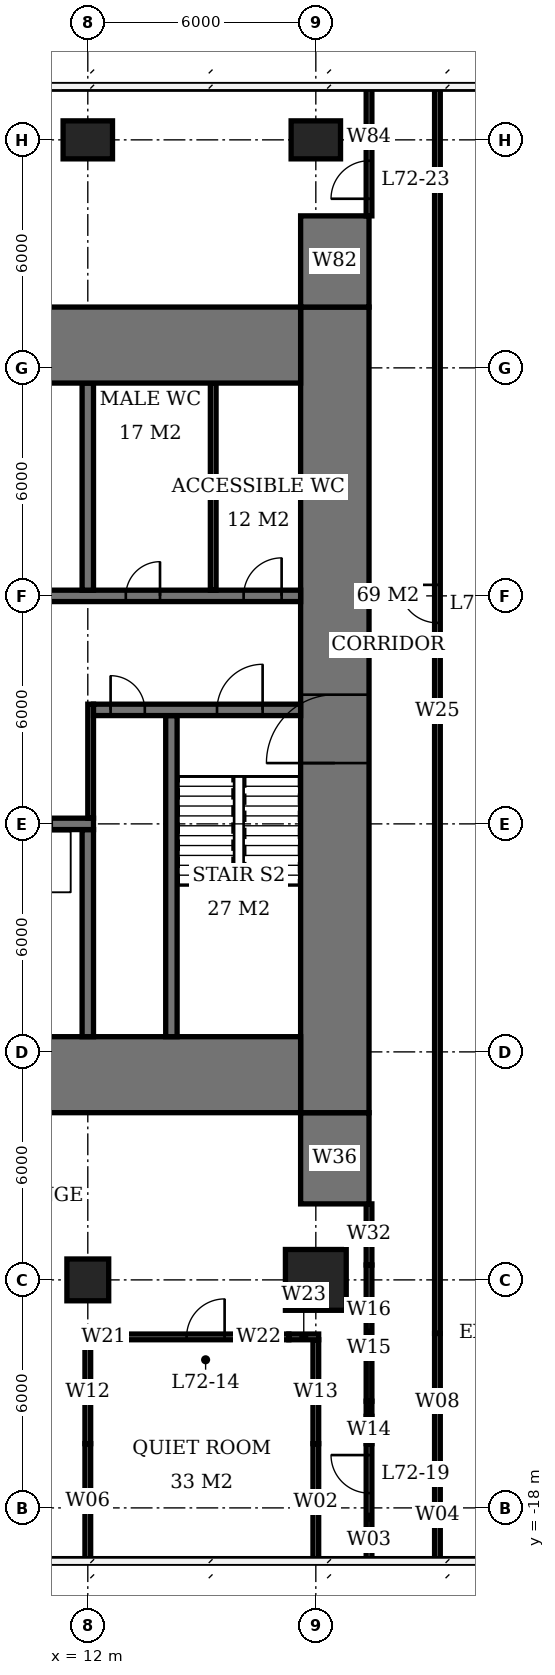
"""IFC4 building model, lengths in metres.
Left out: names, types, materials, properties, quantities, classifications, styles, units other than length and angle.
Written with IfcOpenShell. Run it as: python <this file> out.ifc"""

import sys

from ifc_helpers import new_model, si_unit, direction, frame, frame_2d, origin, origin_2d, place, context, subcontext, project, spatial, rectangle, extrude, element, fill, save


model = new_model("IFC4")
c1 = context("Model", 3, precision=1e-05, world=origin(), true_north=direction((0.0, 1.0)))
c2 = subcontext(c1, "Body", "Model", "MODEL_VIEW")
j1 = project(units=[si_unit("LENGTHUNIT", "METRE"), si_unit("PLANEANGLEUNIT", "RADIAN")], contexts=[c1])
p1 = place(None, origin())
s1 = spatial("IfcSite", under=j1, at=p1, CompositionType="ELEMENT")
p2 = place(p1, origin())
s2 = spatial("IfcBuilding", under=s1, at=p2, CompositionType="ELEMENT")
p3 = place(p2, frame((0.0, 0.0, 291.8)))
s3 = spatial("IfcBuildingStorey", under=s2, at=p3, CompositionType="ELEMENT", Elevation=291.8)
p4 = place(p3, frame((12.0, -12.0, 0.0), z_axis=(0.0, 0.0, 1.0), x_axis=(1.0, 0.0, 0.0)))
e1 = element("IfcColumn", 1, at=p4, inside=s3, PredefinedType="COLUMN", context=c2, shape_type="SweptSolid", body=[
    extrude(rectangle(XDim=1.1, YDim=1.1, at=origin_2d()), origin(), (0.0, 0.0, 1.0), 3.9),
])
p5 = place(p3, frame((12.0, 18.0, 0.0), z_axis=(0.0, 0.0, 1.0), x_axis=(1.0, 0.0, 0.0)))
e2 = element("IfcColumn", 2, at=p5, inside=s3, PredefinedType="COLUMN", context=c2, shape_type="SweptSolid", body=[
    extrude(rectangle(XDim=1.3, YDim=1.0, at=origin_2d()), origin(), (0.0, 0.0, 1.0), 3.9),
])
p6 = place(p3, frame((18.0, -12.0, 0.0), z_axis=(0.0, 0.0, 1.0), x_axis=(1.0, 0.0, 0.0)))
e3 = element("IfcColumn", 3, at=p6, inside=s3, PredefinedType="COLUMN", context=c2, shape_type="SweptSolid", body=[
    extrude(rectangle(XDim=1.6, YDim=1.6, at=origin_2d()), origin(), (0.0, 0.0, 1.0), 3.9),
])
p7 = place(p3, frame((18.0, 18.0, 0.0), z_axis=(0.0, 0.0, 1.0), x_axis=(1.0, 0.0, 0.0)))
e4 = element("IfcColumn", 4, at=p7, inside=s3, PredefinedType="COLUMN", context=c2, shape_type="SweptSolid", body=[
    extrude(rectangle(XDim=1.3, YDim=1.0, at=origin_2d()), origin(), (0.0, 0.0, 1.0), 3.9),
])
for number, where, z_axis, x_axis in (
    (5, (-5.6, -6.6, 0.0), (0.0, 0.0, 1.0), (1.0, 0.0, 0.0)),
    (6, (-5.6, 12.6, 0.0), (0.0, 0.0, 1.0), (1.0, 0.0, 0.0)),
):
    element("IfcWall", number, at=place(p3, frame(where, z_axis=z_axis, x_axis=x_axis)), inside=s3, PredefinedType="SHEAR", context=c2, shape_type="SweptSolid", body=[
        extrude(rectangle(XDim=23.2, YDim=2.0, at=frame_2d((11.6, 0.0))), origin(), (0.0, 0.0, 1.0), 3.9),
    ])
p8 = place(p3, frame((18.5, -7.6, 0.0), z_axis=(0.0, 0.0, 1.0), x_axis=(0.0, 1.0, 0.0)))
e7 = element("IfcWall", 7, at=p8, inside=s3, PredefinedType="SHEAR", context=c2, shape_type="SweptSolid", body=[
    extrude(rectangle(XDim=21.2, YDim=1.8, at=frame_2d((10.6, 0.0))), origin(), (0.0, 0.0, 1.0), 3.9),
])
p9 = place(p8, frame((9.2, 0.0, 0.0)))
e8 = element("IfcOpeningElement", 8, at=p9, cuts=e7, PredefinedType="OPENING", context=c2, shape_type="SweptSolid", body=[
    extrude(rectangle(XDim=1.8, YDim=2.4, at=frame_2d((0.9, 1.2))), frame((0.0, 0.91, 0.0), z_axis=(0.0, -1.0, 0.0), x_axis=(1.0, 0.0, 0.0)), (0.0, 0.0, 1.0), 1.82),
])
for number, where, z_axis, x_axis in (
    (9, (18.5, -10.0, 0.0), (0.0, 0.0, 1.0), (0.0, 1.0, 0.0)),
    (10, (18.5, 13.6, 0.0), (0.0, 0.0, 1.0), (0.0, 1.0, 0.0)),
):
    element("IfcWall", number, at=place(p3, frame(where, z_axis=z_axis, x_axis=x_axis)), inside=s3, PredefinedType="SHEAR", context=c2, shape_type="SweptSolid", body=[
        extrude(rectangle(XDim=2.4, YDim=1.8, at=frame_2d((1.2, 0.0))), origin(), (0.0, 0.0, 1.0), 3.9),
    ])
p10 = place(p3, frame((-5.6, 0.0, 0.0), z_axis=(0.0, 0.0, 1.0), x_axis=(1.0, 0.0, 0.0)))
e11 = element("IfcWall", 11, at=p10, inside=s3, PredefinedType="SHEAR", context=c2, shape_type="SweptSolid", body=[
    extrude(rectangle(XDim=17.75, YDim=0.3, at=frame_2d((8.875, 0.0))), origin(), (0.0, 0.0, 1.0), 3.9),
])
p11 = place(p10, frame((0.6, 0.0, 0.0)))
e12 = element("IfcOpeningElement", 12, at=p11, cuts=e11, PredefinedType="OPENING", context=c2, shape_type="SweptSolid", body=[
    extrude(rectangle(XDim=0.9, YDim=2.1, at=frame_2d((0.45, 1.05))), frame((0.0, 0.16, 0.0), z_axis=(0.0, -1.0, 0.0), x_axis=(1.0, 0.0, 0.0)), (0.0, 0.0, 1.0), 0.32),
])
p12 = place(p10, frame((3.7, 0.0, 0.0)))
e13 = element("IfcOpeningElement", 13, at=p12, cuts=e11, PredefinedType="OPENING", context=c2, shape_type="SweptSolid", body=[
    extrude(rectangle(XDim=1.0, YDim=2.1, at=frame_2d((0.5, 1.05))), frame((0.0, 0.16, 0.0), z_axis=(0.0, -1.0, 0.0), x_axis=(1.0, 0.0, 0.0)), (0.0, 0.0, 1.0), 0.32),
])
p13 = place(p10, frame((9.6, 0.0, 0.0)))
e14 = element("IfcOpeningElement", 14, at=p13, cuts=e11, PredefinedType="OPENING", context=c2, shape_type="SweptSolid", body=[
    extrude(rectangle(XDim=1.0, YDim=2.1, at=frame_2d((0.5, 1.05))), frame((0.0, 0.16, 0.0), z_axis=(0.0, -1.0, 0.0), x_axis=(1.0, 0.0, 0.0)), (0.0, 0.0, 1.0), 0.32),
])
p14 = place(p10, frame((12.55, 0.0, 0.0)))
e15 = element("IfcOpeningElement", 15, at=p14, cuts=e11, PredefinedType="OPENING", context=c2, shape_type="SweptSolid", body=[
    extrude(rectangle(XDim=1.1, YDim=2.1, at=frame_2d((0.55, 1.05))), frame((0.0, 0.16, 0.0), z_axis=(0.0, -1.0, 0.0), x_axis=(1.0, 0.0, 0.0)), (0.0, 0.0, 1.0), 0.32),
])
p15 = place(p10, frame((15.55, 0.0, 0.0)))
e16 = element("IfcOpeningElement", 16, at=p15, cuts=e11, PredefinedType="OPENING", context=c2, shape_type="SweptSolid", body=[
    extrude(rectangle(XDim=1.1, YDim=2.1, at=frame_2d((0.55, 1.05))), frame((0.0, 0.16, 0.0), z_axis=(0.0, -1.0, 0.0), x_axis=(1.0, 0.0, 0.0)), (0.0, 0.0, 1.0), 0.32),
])
p16 = place(p3, frame((12.15, 3.0, 0.0), z_axis=(0.0, 0.0, 1.0), x_axis=(1.0, 0.0, 0.0)))
e17 = element("IfcWall", 17, at=p16, inside=s3, PredefinedType="SHEAR", context=c2, shape_type="SweptSolid", body=[
    extrude(rectangle(XDim=5.45, YDim=0.3, at=frame_2d((2.725, 0.0))), origin(), (0.0, 0.0, 1.0), 3.9),
])
p17 = place(p16, frame((3.25, 0.0, 0.0)))
e18 = element("IfcOpeningElement", 18, at=p17, cuts=e17, PredefinedType="OPENING", context=c2, shape_type="SweptSolid", body=[
    extrude(rectangle(XDim=1.2, YDim=2.1, at=frame_2d((0.6, 1.05))), frame((0.0, 0.16, 0.0), z_axis=(0.0, -1.0, 0.0), x_axis=(1.0, 0.0, 0.0)), (0.0, 0.0, 1.0), 0.32),
])
p18 = place(p16, frame((0.45, 0.0, 0.0)))
e19 = element("IfcOpeningElement", 19, at=p18, cuts=e17, PredefinedType="OPENING", context=c2, shape_type="SweptSolid", body=[
    extrude(rectangle(XDim=0.9, YDim=2.1, at=frame_2d((0.45, 1.05))), frame((0.0, 0.16, 0.0), z_axis=(0.0, -1.0, 0.0), x_axis=(1.0, 0.0, 0.0)), (0.0, 0.0, 1.0), 0.32),
])
p19 = place(p3, frame((-0.15, 6.0, 0.0), z_axis=(0.0, 0.0, 1.0), x_axis=(1.0, 0.0, 0.0)))
e20 = element("IfcWall", 20, at=p19, inside=s3, PredefinedType="SHEAR", context=c2, shape_type="SweptSolid", body=[
    extrude(rectangle(XDim=17.75, YDim=0.3, at=frame_2d((8.875, 0.0))), origin(), (0.0, 0.0, 1.0), 3.9),
])
p20 = place(p19, frame((13.15, 0.0, 0.0)))
e21 = element("IfcOpeningElement", 21, at=p20, cuts=e20, PredefinedType="OPENING", context=c2, shape_type="SweptSolid", body=[
    extrude(rectangle(XDim=0.9, YDim=2.1, at=frame_2d((0.45, 1.05))), frame((0.0, 0.16, 0.0), z_axis=(0.0, -1.0, 0.0), x_axis=(1.0, 0.0, 0.0)), (0.0, 0.0, 1.0), 0.32),
])
p21 = place(p19, frame((16.25, 0.0, 0.0)))
e22 = element("IfcOpeningElement", 22, at=p21, cuts=e20, PredefinedType="OPENING", context=c2, shape_type="SweptSolid", body=[
    extrude(rectangle(XDim=1.0, YDim=2.1, at=frame_2d((0.5, 1.05))), frame((0.0, 0.16, 0.0), z_axis=(0.0, -1.0, 0.0), x_axis=(1.0, 0.0, 0.0)), (0.0, 0.0, 1.0), 0.32),
])
p22 = place(p19, frame((1.1, 0.0, 0.0)))
e23 = element("IfcOpeningElement", 23, at=p22, cuts=e20, PredefinedType="OPENING", context=c2, shape_type="SweptSolid", body=[
    extrude(rectangle(XDim=1.1, YDim=2.1, at=frame_2d((0.55, 1.05))), frame((0.0, 0.16, 0.0), z_axis=(0.0, -1.0, 0.0), x_axis=(1.0, 0.0, 0.0)), (0.0, 0.0, 1.0), 0.32),
])
p23 = place(p19, frame((4.1, 0.0, 0.0)))
e24 = element("IfcOpeningElement", 24, at=p23, cuts=e20, PredefinedType="OPENING", context=c2, shape_type="SweptSolid", body=[
    extrude(rectangle(XDim=1.1, YDim=2.1, at=frame_2d((0.55, 1.05))), frame((0.0, 0.16, 0.0), z_axis=(0.0, -1.0, 0.0), x_axis=(1.0, 0.0, 0.0)), (0.0, 0.0, 1.0), 0.32),
])
for number, where, z_axis, x_axis in (
    (25, (12.0, -5.6, 0.0), (0.0, 0.0, 1.0), (0.0, 1.0, 0.0)),
    (26, (12.0, 6.15, 0.0), (0.0, 0.0, 1.0), (0.0, 1.0, 0.0)),
):
    element("IfcWall", number, at=place(p3, frame(where, z_axis=z_axis, x_axis=x_axis)), inside=s3, PredefinedType="SHEAR", context=c2, shape_type="SweptSolid", body=[
        extrude(rectangle(XDim=5.45, YDim=0.3, at=frame_2d((2.725, 0.0))), origin(), (0.0, 0.0, 1.0), 3.9),
    ])
p24 = place(p3, frame((14.2, -5.6, 0.0), z_axis=(0.0, 0.0, 1.0), x_axis=(0.0, 1.0, 0.0)))
e27 = element("IfcWall", 27, at=p24, inside=s3, PredefinedType="SHEAR", context=c2, shape_type="SweptSolid", body=[
    extrude(rectangle(XDim=8.45, YDim=0.3, at=frame_2d((4.225, 0.0))), origin(), (0.0, 0.0, 1.0), 3.9),
])
p25 = place(p3, frame((15.3, 6.15, 0.0), z_axis=(0.0, 0.0, 1.0), x_axis=(0.0, 1.0, 0.0)))
e28 = element("IfcWall", 28, at=p25, inside=s3, PredefinedType="PLUMBINGWALL", context=c2, shape_type="SweptSolid", body=[
    extrude(rectangle(XDim=5.45, YDim=0.15, at=frame_2d((2.725, 0.0))), origin(), (0.0, 0.0, 1.0), 3.65),
])
p26 = place(p3, frame((11.925, -13.5, 0.0), z_axis=(0.0, 0.0, 1.0), x_axis=(1.0, 0.0, 0.0)))
e29 = element("IfcWall", 29, at=p26, inside=s3, PredefinedType="PARTITIONING", context=c2, shape_type="SweptSolid", body=[
    extrude(rectangle(XDim=0.985, YDim=0.15, at=frame_2d((0.492, 0.0))), origin(), (0.0, 0.0, 1.0), 2.65),
])
p27 = place(p3, frame((12.91, -13.5, 0.0), z_axis=(0.0, 0.0, 1.0), x_axis=(1.0, 0.0, 0.0)))
e30 = element("IfcWall", 30, at=p27, inside=s3, PredefinedType="PARTITIONING", context=c2, shape_type="SweptSolid", body=[
    extrude(rectangle(XDim=4.38, YDim=0.15, at=frame_2d((2.19, 0.0))), origin(), (0.0, 0.0, 1.0), 3.65),
])
p28 = place(p27, frame((1.69, 0.0, 0.0)))
e31 = element("IfcOpeningElement", 31, at=p28, cuts=e30, PredefinedType="OPENING", context=c2, shape_type="SweptSolid", body=[
    extrude(rectangle(XDim=1.0, YDim=2.4, at=frame_2d((0.5, 1.2))), frame((0.0, 0.085, 0.0), z_axis=(0.0, -1.0, 0.0), x_axis=(1.0, 0.0, 0.0)), (0.0, 0.0, 1.0), 0.17),
])
p29 = place(p3, frame((17.29, -13.5, 0.0), z_axis=(0.0, 0.0, 1.0), x_axis=(1.0, 0.0, 0.0)))
e32 = element("IfcWall", 32, at=p29, inside=s3, PredefinedType="PARTITIONING", context=c2, shape_type="SweptSolid", body=[
    extrude(rectangle(XDim=0.785, YDim=0.15, at=frame_2d((0.393, 0.0))), origin(), (0.0, 0.0, 1.0), 2.65),
])
p30 = place(p3, frame((12.0, -19.35, 0.0), z_axis=(0.0, 0.0, 1.0), x_axis=(0.0, 1.0, 0.0)))
e33 = element("IfcWall", 33, at=p30, inside=s3, PredefinedType="PARTITIONING", context=c2, shape_type="SweptSolid", body=[
    extrude(rectangle(XDim=3.04, YDim=0.15, at=frame_2d((1.52, 0.0))), origin(), (0.0, 0.0, 1.0), 3.65),
])
p31 = place(p3, frame((12.0, -16.31, 0.0), z_axis=(0.0, 0.0, 1.0), x_axis=(0.0, 1.0, 0.0)))
e34 = element("IfcWall", 34, at=p31, inside=s3, PredefinedType="PARTITIONING", context=c2, shape_type="SweptSolid", body=[
    extrude(rectangle(XDim=2.735, YDim=0.15, at=frame_2d((1.368, 0.0))), origin(), (0.0, 0.0, 1.0), 2.65),
])
p32 = place(p3, frame((18.0, -19.375, 0.0), z_axis=(0.0, 0.0, 1.0), x_axis=(0.0, 1.0, 0.0)))
e35 = element("IfcWall", 35, at=p32, inside=s3, PredefinedType="PARTITIONING", context=c2, shape_type="SweptSolid", body=[
    extrude(rectangle(XDim=3.065, YDim=0.15, at=frame_2d((1.532, 0.0))), origin(), (0.0, 0.0, 1.0), 3.65),
])
p33 = place(p3, frame((18.0, -16.31, 0.0), z_axis=(0.0, 0.0, 1.0), x_axis=(0.0, 1.0, 0.0)))
e36 = element("IfcWall", 36, at=p33, inside=s3, PredefinedType="PARTITIONING", context=c2, shape_type="SweptSolid", body=[
    extrude(rectangle(XDim=2.735, YDim=0.15, at=frame_2d((1.368, 0.0))), origin(), (0.0, 0.0, 1.0), 2.65),
])
p34 = place(p3, frame((19.4, -19.375, 0.0), z_axis=(0.0, 0.0, 1.0), x_axis=(0.0, 1.0, 0.0)))
e37 = element("IfcWall", 37, at=p34, inside=s3, PredefinedType="PARTITIONING", context=c2, shape_type="SweptSolid", body=[
    extrude(rectangle(XDim=3.065, YDim=0.15, at=frame_2d((1.532, 0.0))), origin(), (0.0, 0.0, 1.0), 3.65),
])
p35 = place(p34, frame((1.765, 0.0, 0.0)))
e38 = element("IfcOpeningElement", 38, at=p35, cuts=e37, PredefinedType="OPENING", context=c2, shape_type="SweptSolid", body=[
    extrude(rectangle(XDim=1.0, YDim=2.4, at=frame_2d((0.5, 1.2))), frame((0.0, 0.085, 0.0), z_axis=(0.0, -1.0, 0.0), x_axis=(1.0, 0.0, 0.0)), (0.0, 0.0, 1.0), 0.17),
])
p36 = place(p3, frame((19.4, -16.31, 0.0), z_axis=(0.0, 0.0, 1.0), x_axis=(0.0, 1.0, 0.0)))
e39 = element("IfcWall", 39, at=p36, inside=s3, PredefinedType="PARTITIONING", context=c2, shape_type="SweptSolid", body=[
    extrude(rectangle(XDim=0.72, YDim=0.15, at=frame_2d((0.36, 0.0))), origin(), (0.0, 0.0, 1.0), 2.65),
])
p37 = place(p3, frame((19.4, -15.59, 0.0), z_axis=(0.0, 0.0, 1.0), x_axis=(0.0, 1.0, 0.0)))
e40 = element("IfcWall", 40, at=p37, inside=s3, PredefinedType="PARTITIONING", context=c2, shape_type="SweptSolid", body=[
    extrude(rectangle(XDim=0.398, YDim=0.15, at=frame_2d((0.199, 0.0))), origin(), (0.0, 0.0, 1.0), 3.65),
])
p38 = place(p3, frame((19.4, -15.192, 0.0), z_axis=(0.0, 0.0, 1.0), x_axis=(0.0, 1.0, 0.0)))
e41 = element("IfcWall", 41, at=p38, inside=s3, PredefinedType="PARTITIONING", context=c2, shape_type="SweptSolid", body=[
    extrude(rectangle(XDim=3.584, YDim=0.15, at=frame_2d((1.792, 0.0))), origin(), (0.0, 0.0, 1.0), 2.65),
])
p39 = place(p3, frame((19.4, -11.608, 0.0), z_axis=(0.0, 0.0, 1.0), x_axis=(0.0, 1.0, 0.0)))
e42 = element("IfcWall", 42, at=p39, inside=s3, PredefinedType="PARTITIONING", context=c2, shape_type="SweptSolid", body=[
    extrude(rectangle(XDim=1.608, YDim=0.15, at=frame_2d((0.804, 0.0))), origin(), (0.0, 0.0, 1.0), 3.65),
])
p40 = place(p3, frame((19.4, 16.0, 0.0), z_axis=(0.0, 0.0, 1.0), x_axis=(0.0, 1.0, 0.0)))
e43 = element("IfcWall", 43, at=p40, inside=s3, PredefinedType="PARTITIONING", context=c2, shape_type="SweptSolid", body=[
    extrude(rectangle(XDim=3.375, YDim=0.15, at=frame_2d((1.688, 0.0))), origin(), (0.0, 0.0, 1.0), 3.65),
])
p41 = place(p40, frame((0.45, 0.0, 0.0)))
e44 = element("IfcOpeningElement", 44, at=p41, cuts=e43, PredefinedType="OPENING", context=c2, shape_type="SweptSolid", body=[
    extrude(rectangle(XDim=1.0, YDim=2.1, at=frame_2d((0.5, 1.05))), frame((0.0, 0.085, 0.0), z_axis=(0.0, -1.0, 0.0), x_axis=(1.0, 0.0, 0.0)), (0.0, 0.0, 1.0), 0.17),
])
p42 = place(p3, frame((21.2, -19.375, 0.0), z_axis=(0.0, 0.0, 1.0), x_axis=(0.0, 1.0, 0.0)))
e45 = element("IfcWall", 45, at=p42, inside=s3, PredefinedType="PARTITIONING", context=c2, shape_type="SweptSolid", body=[
    extrude(rectangle(XDim=2.383, YDim=0.15, at=frame_2d((1.191, 0.0))), origin(), (0.0, 0.0, 1.0), 3.65),
])
p43 = place(p3, frame((21.2, -16.992, 0.0), z_axis=(0.0, 0.0, 1.0), x_axis=(0.0, 1.0, 0.0)))
e46 = element("IfcWall", 46, at=p43, inside=s3, PredefinedType="PARTITIONING", context=c2, shape_type="SweptSolid", body=[
    extrude(rectangle(XDim=3.584, YDim=0.15, at=frame_2d((1.792, 0.0))), origin(), (0.0, 0.0, 1.0), 2.65),
])
p44 = place(p3, frame((21.2, -13.408, 0.0), z_axis=(0.0, 0.0, 1.0), x_axis=(0.0, 1.0, 0.0)))
e47 = element("IfcWall", 47, at=p44, inside=s3, PredefinedType="PARTITIONING", context=c2, shape_type="SweptSolid", body=[
    extrude(rectangle(XDim=32.783, YDim=0.15, at=frame_2d((16.392, 0.0))), origin(), (0.0, 0.0, 1.0), 3.65),
])
p45 = place(p44, frame((18.698, 0.0, 0.0)))
e48 = element("IfcOpeningElement", 48, at=p45, cuts=e47, PredefinedType="OPENING", context=c2, shape_type="SweptSolid", body=[
    extrude(rectangle(XDim=1.0, YDim=2.4, at=frame_2d((0.5, 1.2))), frame((0.0, 0.085, 0.0), z_axis=(0.0, -1.0, 0.0), x_axis=(1.0, 0.0, 0.0)), (0.0, 0.0, 1.0), 0.17),
])
p46 = place(p3, frame((12.075, 0.15, 0.0), z_axis=(0.0, 0.0, 1.0), x_axis=(0.0, 1.0, 0.0)))
e49 = element("IfcWall", 49, at=p46, inside=s3, PredefinedType="PARTITIONING", context=c2, shape_type="SweptSolid", body=[
    extrude(rectangle(XDim=3.0, YDim=0.15, at=frame_2d((1.5, 0.0))), origin(), (0.0, 0.0, 1.0), 3.65),
])
p47 = place(p9, origin())
e50 = element("IfcDoor", 50, at=p47, inside=s3, OperationType="DOUBLE_DOOR_SINGLE_SWING", PredefinedType="DOOR", context=c2, shape_type="SweptSolid", body=[
    extrude(rectangle(XDim=1.8, YDim=2.4, at=frame_2d((0.9, 1.2))), frame((0.0, 0.025, 0.0), z_axis=(0.0, -1.0, 0.0), x_axis=(1.0, 0.0, 0.0)), (0.0, 0.0, 1.0), 0.05),
])
fill(e8, e50)
p48 = place(p17, origin())
e51 = element("IfcDoor", 51, at=p48, inside=s3, OperationType="SINGLE_SWING_RIGHT", PredefinedType="DOOR", context=c2, shape_type="SweptSolid", body=[
    extrude(rectangle(XDim=1.2, YDim=2.1, at=frame_2d((0.6, 1.05))), frame((0.0, 0.025, 0.0), z_axis=(0.0, -1.0, 0.0), x_axis=(1.0, 0.0, 0.0)), (0.0, 0.0, 1.0), 0.05),
])
fill(e18, e51)
p49 = place(p18, origin())
e52 = element("IfcDoor", 52, at=p49, inside=s3, OperationType="SINGLE_SWING_LEFT", PredefinedType="DOOR", context=c2, shape_type="SweptSolid", body=[
    extrude(rectangle(XDim=0.9, YDim=2.1, at=frame_2d((0.45, 1.05))), frame((0.0, 0.025, 0.0), z_axis=(0.0, -1.0, 0.0), x_axis=(1.0, 0.0, 0.0)), (0.0, 0.0, 1.0), 0.05),
])
fill(e19, e52)
p50 = place(p20, origin())
e53 = element("IfcDoor", 53, at=p50, inside=s3, OperationType="SINGLE_SWING_RIGHT", PredefinedType="DOOR", context=c2, shape_type="SweptSolid", body=[
    extrude(rectangle(XDim=0.9, YDim=2.1, at=frame_2d((0.45, 1.05))), frame((0.0, 0.025, 0.0), z_axis=(0.0, -1.0, 0.0), x_axis=(1.0, 0.0, 0.0)), (0.0, 0.0, 1.0), 0.05),
])
fill(e21, e53)
p51 = place(p21, origin())
e54 = element("IfcDoor", 54, at=p51, inside=s3, OperationType="SINGLE_SWING_RIGHT", PredefinedType="DOOR", context=c2, shape_type="SweptSolid", body=[
    extrude(rectangle(XDim=1.0, YDim=2.1, at=frame_2d((0.5, 1.05))), frame((0.0, 0.025, 0.0), z_axis=(0.0, -1.0, 0.0), x_axis=(1.0, 0.0, 0.0)), (0.0, 0.0, 1.0), 0.05),
])
fill(e22, e54)
p52 = place(p28, origin())
e55 = element("IfcDoor", 55, at=p52, inside=s3, OperationType="SINGLE_SWING_RIGHT", PredefinedType="DOOR", context=c2, shape_type="SweptSolid", body=[
    extrude(rectangle(XDim=1.0, YDim=2.4, at=frame_2d((0.5, 1.2))), frame((0.0, 0.025, 0.0), z_axis=(0.0, -1.0, 0.0), x_axis=(1.0, 0.0, 0.0)), (0.0, 0.0, 1.0), 0.05),
])
fill(e31, e55)
p53 = place(p35, origin())
e56 = element("IfcDoor", 56, at=p53, inside=s3, OperationType="SINGLE_SWING_RIGHT", PredefinedType="DOOR", context=c2, shape_type="SweptSolid", body=[
    extrude(rectangle(XDim=1.0, YDim=2.4, at=frame_2d((0.5, 1.2))), frame((0.0, 0.025, 0.0), z_axis=(0.0, -1.0, 0.0), x_axis=(1.0, 0.0, 0.0)), (0.0, 0.0, 1.0), 0.05),
])
fill(e38, e56)
p54 = place(p45, origin())
e57 = element("IfcDoor", 57, at=p54, inside=s3, OperationType="SINGLE_SWING_RIGHT", PredefinedType="DOOR", context=c2, shape_type="SweptSolid", body=[
    extrude(rectangle(XDim=1.0, YDim=2.4, at=frame_2d((0.5, 1.2))), frame((0.0, 0.025, 0.0), z_axis=(0.0, -1.0, 0.0), x_axis=(1.0, 0.0, 0.0)), (0.0, 0.0, 1.0), 0.05),
])
fill(e48, e57)
p55 = place(p41, origin())
e58 = element("IfcDoor", 58, at=p55, inside=s3, OperationType="SINGLE_SWING_LEFT", PredefinedType="DOOR", context=c2, shape_type="SweptSolid", body=[
    extrude(rectangle(XDim=1.0, YDim=2.1, at=frame_2d((0.5, 1.05))), frame((0.0, 0.025, 0.0), z_axis=(0.0, -1.0, 0.0), x_axis=(1.0, 0.0, 0.0)), (0.0, 0.0, 1.0), 0.05),
])
fill(e44, e58)
save(model, sys.argv[1])
